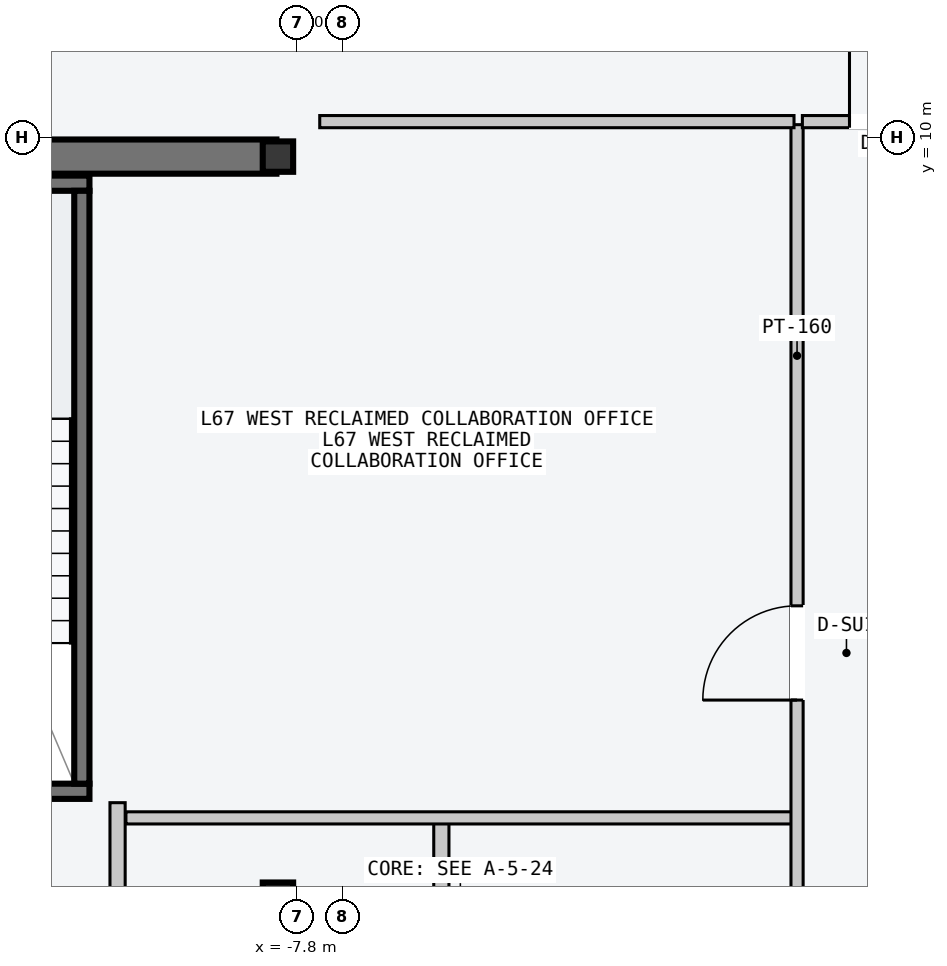
"""IFC4 building model, lengths in metres.
Left out: names, types, materials, properties, quantities, classifications, styles, units other than length and angle.
Written with IfcOpenShell. Run it as: python <this file> out.ifc"""

import sys

from ifc_helpers import new_model, si_unit, direction, frame, frame_2d, origin, origin_2d, place, context, subcontext, project, spatial, rectangle, i_section, extrude, element, fill, save


model = new_model("IFC4")
c1 = context("Model", 3, precision=1e-05, world=origin(), true_north=direction((0.0, 1.0)))
c2 = subcontext(c1, "Body", "Model", "MODEL_VIEW")
j1 = project(units=[si_unit("LENGTHUNIT", "METRE"), si_unit("PLANEANGLEUNIT", "RADIAN")], contexts=[c1])
p1 = place(None, origin())
s1 = spatial("IfcSite", under=j1, at=p1, CompositionType="ELEMENT")
p2 = place(p1, origin())
s2 = spatial("IfcBuilding", under=s1, at=p2, CompositionType="ELEMENT")
p3 = place(p2, frame((0.0, 0.0, 254.4)))
s3 = spatial("IfcBuildingStorey", under=s2, at=p3, CompositionType="ELEMENT", Elevation=254.4)
p4 = place(p3, frame((-14.53, 9.75, -0.2), z_axis=(0.0, 0.0, 1.0), x_axis=(1.0, 0.0, 0.0)))
e1 = element("IfcWall", 1, at=p4, inside=s3, PredefinedType="SHEAR", context=c2, shape_type="SweptSolid", body=[
    extrude(rectangle(XDim=6.46, YDim=0.45, at=frame_2d((3.23, 0.0))), origin(), (0.0, 0.0, 1.0), 3.6),
])
p5 = place(p3, frame((-14.25, 1.4, -0.2), z_axis=(0.0, 0.0, 1.0), x_axis=(1.0, 0.0, 0.0)))
e2 = element("IfcWall", 2, at=p5, inside=s3, PredefinedType="SOLIDWALL", context=c2, shape_type="SweptSolid", body=[
    extrude(rectangle(XDim=3.72, YDim=0.2, at=frame_2d((1.86, 0.0))), origin(), (0.0, 0.0, 1.0), 3.6),
])
p6 = place(p5, frame((1.5, 0.0, 0.2)))
e3 = element("IfcOpeningElement", 3, at=p6, cuts=e2, PredefinedType="OPENING", context=c2, shape_type="SweptSolid", body=[
    extrude(rectangle(XDim=1.12, YDim=2.18, at=frame_2d((0.56, 1.09))), frame((0.0, 0.11, 0.0), z_axis=(0.0, -1.0, 0.0), x_axis=(1.0, 0.0, 0.0)), (0.0, 0.0, 1.0), 0.22),
])
p7 = place(p3, frame((-14.25, 9.4, -0.2), z_axis=(0.0, 0.0, 1.0), x_axis=(1.0, 0.0, 0.0)))
e4 = element("IfcWall", 4, at=p7, inside=s3, PredefinedType="SOLIDWALL", context=c2, shape_type="SweptSolid", body=[
    extrude(rectangle(XDim=3.72, YDim=0.2, at=frame_2d((1.86, 0.0))), origin(), (0.0, 0.0, 1.0), 3.6),
])
p8 = place(p3, frame((-10.63, 1.5, -0.2), z_axis=(0.0, 0.0, 1.0), x_axis=(0.0, 1.0, 0.0)))
e5 = element("IfcWall", 5, at=p8, inside=s3, PredefinedType="SOLIDWALL", context=c2, shape_type="SweptSolid", body=[
    extrude(rectangle(XDim=7.8, YDim=0.2, at=frame_2d((3.9, 0.0))), origin(), (0.0, 0.0, 1.0), 3.6),
])
for number, where, z_axis, x_axis in (
    (6, (-8.05, 0.0, 0.0), (0.0, 0.0, 1.0), (1.0, 0.0, 0.0)),
    (7, (-8.05, 9.75, 0.0), (0.0, 0.0, 1.0), (1.0, 0.0, 0.0)),
):
    element("IfcColumn", number, at=place(p3, frame(where, z_axis=z_axis, x_axis=x_axis)), inside=s3, PredefinedType="COLUMN", context=c2, shape_type="SweptSolid", body=[
        extrude(i_section(OverallWidth=0.4, OverallDepth=0.4, WebThickness=0.013, FlangeThickness=0.021, at=origin_2d()), origin(), (0.0, 0.0, 1.0), 3.6),
    ])
p9 = place(p3, frame((-5.9, -9.45, 0.0), z_axis=(0.0, 0.0, 1.0), x_axis=(0.0, 1.0, 0.0)))
e8 = element("IfcWall", 8, at=p9, inside=s3, PredefinedType="PARTITIONING", context=c2, shape_type="SweptSolid", body=[
    extrude(rectangle(XDim=10.5, YDim=0.2, at=frame_2d((5.25, 0.0))), origin(), (0.0, 0.0, 1.0), 3.4),
])
p10 = place(p9, frame((3.9, 0.0, 0.0)))
e9 = element("IfcOpeningElement", 9, at=p10, cuts=e8, PredefinedType="OPENING", context=c2, shape_type="SweptSolid", body=[
    extrude(rectangle(XDim=1.5, YDim=2.2, at=frame_2d((0.75, 1.1))), frame((0.0, 0.11, 0.0), z_axis=(0.0, -1.0, 0.0), x_axis=(1.0, 0.0, 0.0)), (0.0, 0.0, 1.0), 0.22),
])
p11 = place(p3, frame((-10.16, -2.55, 0.0), z_axis=(0.0, 0.0, 1.0), x_axis=(0.0, 1.0, 0.0)))
e10 = element("IfcWall", 10, at=p11, inside=s3, PredefinedType="PARTITIONING", context=c2, shape_type="SweptSolid", body=[
    extrude(rectangle(XDim=3.8, YDim=0.2, at=frame_2d((1.9, 0.0))), origin(), (0.0, 0.0, 1.0), 3.4),
])
p12 = place(p11, frame((1.3, 0.0, 0.0)))
e11 = element("IfcOpeningElement", 11, at=p12, cuts=e10, PredefinedType="OPENING", context=c2, shape_type="SweptSolid", body=[
    extrude(rectangle(XDim=1.1, YDim=2.15, at=frame_2d((0.55, 1.075))), frame((0.0, 0.11, 0.0), z_axis=(0.0, -1.0, 0.0), x_axis=(1.0, 0.0, 0.0)), (0.0, 0.0, 1.0), 0.22),
])
p13 = place(p3, frame((-10.05, 1.05, 0.0), z_axis=(0.0, 0.0, 1.0), x_axis=(1.0, 0.0, 0.0)))
e12 = element("IfcWall", 12, at=p13, inside=s3, PredefinedType="PARTITIONING", context=c2, shape_type="SweptSolid", body=[
    extrude(rectangle(XDim=8.79, YDim=0.16, at=frame_2d((4.395, 0.0))), origin(), (0.0, 0.0, 1.0), 3.4),
])
p14 = place(p3, frame((-1.22, -3.5, 0.0), z_axis=(0.0, 0.0, 1.0), x_axis=(0.0, 1.0, 0.0)))
e13 = element("IfcWall", 13, at=p14, inside=s3, PredefinedType="PARTITIONING", context=c2, shape_type="SweptSolid", body=[
    extrude(rectangle(XDim=13.67, YDim=0.16, at=frame_2d((6.835, 0.0))), origin(), (0.0, 0.0, 1.0), 3.4),
])
p15 = place(p14, frame((6.1, 0.0, 0.0)))
e14 = element("IfcOpeningElement", 14, at=p15, cuts=e13, PredefinedType="OPENING", context=c2, shape_type="SweptSolid", body=[
    extrude(rectangle(XDim=1.24, YDim=2.24, at=frame_2d((0.62, 1.12))), frame((0.0, 0.09, 0.0), z_axis=(0.0, -1.0, 0.0), x_axis=(1.0, 0.0, 0.0)), (0.0, 0.0, 1.0), 0.18),
])
p16 = place(p14, frame((1.6, 0.0, 0.0)))
e15 = element("IfcOpeningElement", 15, at=p16, cuts=e13, PredefinedType="OPENING", context=c2, shape_type="SweptSolid", body=[
    extrude(rectangle(XDim=0.96, YDim=2.18, at=frame_2d((0.48, 1.09))), frame((0.0, 0.09, 0.0), z_axis=(0.0, -1.0, 0.0), x_axis=(1.0, 0.0, 0.0)), (0.0, 0.0, 1.0), 0.18),
])
p17 = place(p3, frame((-7.5, 10.21, 0.0), z_axis=(0.0, 0.0, 1.0), x_axis=(1.0, 0.0, 0.0)))
e16 = element("IfcWall", 16, at=p17, inside=s3, PredefinedType="PARTITIONING", context=c2, shape_type="SweptSolid", body=[
    extrude(rectangle(XDim=6.24, YDim=0.16, at=frame_2d((3.12, 0.0))), origin(), (0.0, 0.0, 1.0), 3.4),
])
p18 = place(p3, frame((-1.15, 10.21, 0.0), z_axis=(0.0, 0.0, 1.0), x_axis=(1.0, 0.0, 0.0)))
e17 = element("IfcWall", 17, at=p18, inside=s3, PredefinedType="PARTITIONING", context=c2, shape_type="SweptSolid", body=[
    extrude(rectangle(XDim=2.3, YDim=0.16, at=frame_2d((1.15, 0.0))), origin(), (0.0, 0.0, 1.0), 3.4),
])
p19 = place(p18, frame((0.62, 0.0, 0.0)))
e18 = element("IfcOpeningElement", 18, at=p19, cuts=e17, PredefinedType="OPENING", context=c2, shape_type="SweptSolid", body=[
    extrude(rectangle(XDim=1.06, YDim=2.2, at=frame_2d((0.53, 1.1))), frame((0.0, 0.09, 0.0), z_axis=(0.0, -1.0, 0.0), x_axis=(1.0, 0.0, 0.0)), (0.0, 0.0, 1.0), 0.18),
])
p20 = place(p15, origin())
e19 = element("IfcDoor", 19, at=p20, inside=s3, OperationType="SINGLE_SWING_LEFT", PredefinedType="DOOR", context=c2, shape_type="SweptSolid", body=[
    extrude(rectangle(XDim=1.24, YDim=2.24, at=frame_2d((0.62, 1.12))), frame((0.0, 0.025, 0.0), z_axis=(0.0, -1.0, 0.0), x_axis=(1.0, 0.0, 0.0)), (0.0, 0.0, 1.0), 0.05),
])
fill(e14, e19)
p21 = place(p19, origin())
e20 = element("IfcDoor", 20, at=p21, inside=s3, OperationType="SINGLE_SWING_LEFT", PredefinedType="DOOR", context=c2, shape_type="SweptSolid", body=[
    extrude(rectangle(XDim=1.06, YDim=2.2, at=frame_2d((0.53, 1.1))), frame((0.0, 0.025, 0.0), z_axis=(0.0, -1.0, 0.0), x_axis=(1.0, 0.0, 0.0)), (0.0, 0.0, 1.0), 0.05),
])
fill(e18, e20)
save(model, sys.argv[1])
